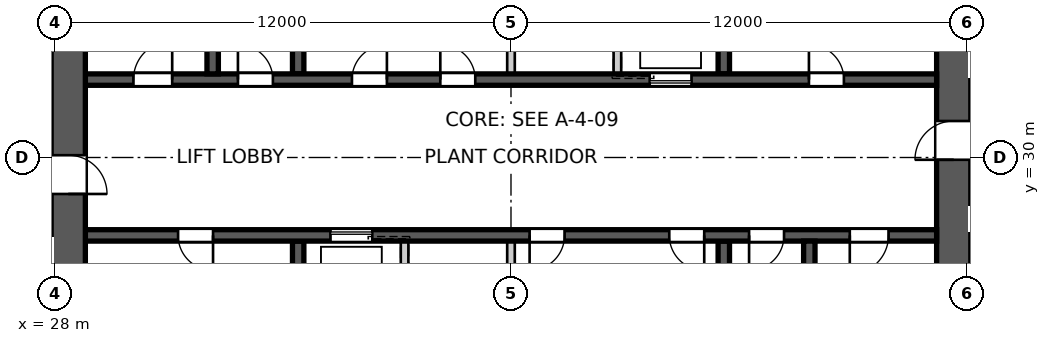
"""IFC4 building model, lengths in metres.
Left out: names, types, materials, properties, quantities, classifications, styles, units other than length and angle.
Written with IfcOpenShell. Run it as: python <this file> out.ifc"""

import sys

from ifc_helpers import new_model, si_unit, direction, frame, frame_2d, origin, place, context, subcontext, project, spatial, polyline, rectangle, outline, extrude, element, fill, save


model = new_model("IFC4")
c1 = context("Model", 3, precision=1e-05, world=origin(), true_north=direction((0.0, 1.0)))
c2 = subcontext(c1, "Body", "Model", "MODEL_VIEW")
j1 = project(units=[si_unit("LENGTHUNIT", "METRE"), si_unit("PLANEANGLEUNIT", "RADIAN")], contexts=[c1])
p1 = place(None, origin())
s1 = spatial("IfcSite", under=j1, at=p1, CompositionType="ELEMENT")
p2 = place(p1, origin())
s2 = spatial("IfcBuilding", under=s1, at=p2, CompositionType="ELEMENT")
p3 = place(p2, frame((0.0, 0.0, 299.8)))
s3 = spatial("IfcBuildingStorey", under=s2, at=p3, CompositionType="ELEMENT", Elevation=299.8)
p4 = place(p3, frame((51.65, 18.8, 0.0), z_axis=(0.0, 0.0, 1.0), x_axis=(0.0, 1.0, 0.0)))
e1 = element("IfcWall", 1, at=p4, inside=s3, PredefinedType="SHEAR", context=c2, shape_type="SweptSolid", body=[
    extrude(outline(polyline([(0.0, -0.45), (22.4, -0.45), (22.4, -0.025), (22.85, -0.025), (22.85, 0.025), (22.4, 0.025), (22.4, 0.45), (0.0, 0.45), (0.0, 0.025), (-0.45, 0.025), (-0.45, -0.025), (0.0, -0.025), (0.0, -0.45)])), origin(), (0.0, 0.0, 1.0), 4.5),
])
p5 = place(p4, frame((11.14, 0.0, 0.0)))
e2 = element("IfcOpeningElement", 2, at=p5, cuts=e1, PredefinedType="OPENING", context=c2, shape_type="SweptSolid", body=[
    extrude(rectangle(XDim=1.02, YDim=2.4, at=frame_2d((0.51, 1.2))), frame((0.0, 0.46, 0.0), z_axis=(0.0, -1.0, 0.0), x_axis=(1.0, 0.0, 0.0)), (0.0, 0.0, 1.0), 0.92),
])
p6 = place(p3, frame((28.35, 41.2, 0.0), z_axis=(0.0, 0.0, 1.0), x_axis=(0.0, -1.0, 0.0)))
e3 = element("IfcWall", 3, at=p6, inside=s3, PredefinedType="SHEAR", context=c2, shape_type="SweptSolid", body=[
    extrude(outline(polyline([(0.0, -0.45), (22.4, -0.45), (22.4, -0.025), (22.85, -0.025), (22.85, 0.025), (22.4, 0.025), (22.4, 0.45), (0.0, 0.45), (0.0, 0.025), (-0.45, 0.025), (-0.45, -0.025), (0.0, -0.025), (0.0, -0.45)])), origin(), (0.0, 0.0, 1.0), 4.5),
])
p7 = place(p6, frame((11.14, 0.0, 0.0)))
e4 = element("IfcOpeningElement", 4, at=p7, cuts=e3, PredefinedType="OPENING", context=c2, shape_type="SweptSolid", body=[
    extrude(rectangle(XDim=1.02, YDim=2.4, at=frame_2d((0.51, 1.2))), frame((0.0, 0.46, 0.0), z_axis=(0.0, -1.0, 0.0), x_axis=(1.0, 0.0, 0.0)), (0.0, 0.0, 1.0), 0.92),
])
p8 = place(p3, frame((28.8, 32.05, 0.0), z_axis=(0.0, 0.0, 1.0), x_axis=(1.0, 0.0, 0.0)))
e5 = element("IfcWall", 5, at=p8, inside=s3, PredefinedType="SHEAR", context=c2, shape_type="SweptSolid", body=[
    extrude(rectangle(XDim=22.4, YDim=0.3, at=frame_2d((11.2, 0.0))), origin(), (0.0, 0.0, 1.0), 4.5),
])
p9 = place(p8, frame((19.04, 0.0, 0.0)))
e6 = element("IfcOpeningElement", 6, at=p9, cuts=e5, PredefinedType="OPENING", context=c2, shape_type="SweptSolid", body=[
    extrude(rectangle(XDim=0.92, YDim=2.1, at=frame_2d((0.46, 1.05))), frame((0.0, 0.16, 0.0), z_axis=(0.0, -1.0, 0.0), x_axis=(1.0, 0.0, 0.0)), (0.0, 0.0, 1.0), 0.32),
])
p10 = place(p8, frame((1.265, 0.0, 0.0)))
e7 = element("IfcOpeningElement", 7, at=p10, cuts=e5, PredefinedType="OPENING", context=c2, shape_type="SweptSolid", body=[
    extrude(rectangle(XDim=1.02, YDim=2.1, at=frame_2d((0.51, 1.05))), frame((0.0, 0.16, 0.0), z_axis=(0.0, -1.0, 0.0), x_axis=(1.0, 0.0, 0.0)), (0.0, 0.0, 1.0), 0.32),
])
p11 = place(p8, frame((4.015, 0.0, 0.0)))
e8 = element("IfcOpeningElement", 8, at=p11, cuts=e5, PredefinedType="OPENING", context=c2, shape_type="SweptSolid", body=[
    extrude(rectangle(XDim=0.92, YDim=2.1, at=frame_2d((0.46, 1.05))), frame((0.0, 0.16, 0.0), z_axis=(0.0, -1.0, 0.0), x_axis=(1.0, 0.0, 0.0)), (0.0, 0.0, 1.0), 0.32),
])
p12 = place(p8, frame((7.015, 0.0, 0.0)))
e9 = element("IfcOpeningElement", 9, at=p12, cuts=e5, PredefinedType="OPENING", context=c2, shape_type="SweptSolid", body=[
    extrude(rectangle(XDim=0.92, YDim=2.1, at=frame_2d((0.46, 1.05))), frame((0.0, 0.16, 0.0), z_axis=(0.0, -1.0, 0.0), x_axis=(1.0, 0.0, 0.0)), (0.0, 0.0, 1.0), 0.32),
])
p13 = place(p8, frame((9.34, 0.0, 0.0)))
e10 = element("IfcOpeningElement", 10, at=p13, cuts=e5, PredefinedType="OPENING", context=c2, shape_type="SweptSolid", body=[
    extrude(rectangle(XDim=0.92, YDim=2.1, at=frame_2d((0.46, 1.05))), frame((0.0, 0.16, 0.0), z_axis=(0.0, -1.0, 0.0), x_axis=(1.0, 0.0, 0.0)), (0.0, 0.0, 1.0), 0.32),
])
p14 = place(p8, frame((14.85, 0.0, 0.0)))
e11 = element("IfcOpeningElement", 11, at=p14, cuts=e5, PredefinedType="OPENING", context=c2, shape_type="SweptSolid", body=[
    extrude(rectangle(XDim=1.1, YDim=2.1, at=frame_2d((0.55, 1.05))), frame((0.0, 0.16, 0.0), z_axis=(0.0, -1.0, 0.0), x_axis=(1.0, 0.0, 0.0)), (0.0, 0.0, 1.0), 0.32),
])
p15 = place(p3, frame((51.2, 27.95, 0.0), z_axis=(0.0, 0.0, 1.0), x_axis=(-1.0, 0.0, 0.0)))
e12 = element("IfcWall", 12, at=p15, inside=s3, PredefinedType="SHEAR", context=c2, shape_type="SweptSolid", body=[
    extrude(rectangle(XDim=22.4, YDim=0.3, at=frame_2d((11.2, 0.0))), origin(), (0.0, 0.0, 1.0), 4.5),
])
p16 = place(p15, frame((19.04, 0.0, 0.0)))
e13 = element("IfcOpeningElement", 13, at=p16, cuts=e12, PredefinedType="OPENING", context=c2, shape_type="SweptSolid", body=[
    extrude(rectangle(XDim=0.92, YDim=2.1, at=frame_2d((0.46, 1.05))), frame((0.0, 0.16, 0.0), z_axis=(0.0, -1.0, 0.0), x_axis=(1.0, 0.0, 0.0)), (0.0, 0.0, 1.0), 0.32),
])
p17 = place(p15, frame((1.265, 0.0, 0.0)))
e14 = element("IfcOpeningElement", 14, at=p17, cuts=e12, PredefinedType="OPENING", context=c2, shape_type="SweptSolid", body=[
    extrude(rectangle(XDim=1.02, YDim=2.1, at=frame_2d((0.51, 1.05))), frame((0.0, 0.16, 0.0), z_axis=(0.0, -1.0, 0.0), x_axis=(1.0, 0.0, 0.0)), (0.0, 0.0, 1.0), 0.32),
])
p18 = place(p15, frame((4.015, 0.0, 0.0)))
e15 = element("IfcOpeningElement", 15, at=p18, cuts=e12, PredefinedType="OPENING", context=c2, shape_type="SweptSolid", body=[
    extrude(rectangle(XDim=0.92, YDim=2.1, at=frame_2d((0.46, 1.05))), frame((0.0, 0.16, 0.0), z_axis=(0.0, -1.0, 0.0), x_axis=(1.0, 0.0, 0.0)), (0.0, 0.0, 1.0), 0.32),
])
p19 = place(p15, frame((9.79, 0.0, 0.0)))
e16 = element("IfcOpeningElement", 16, at=p19, cuts=e12, PredefinedType="OPENING", context=c2, shape_type="SweptSolid", body=[
    extrude(rectangle(XDim=0.92, YDim=2.1, at=frame_2d((0.46, 1.05))), frame((0.0, 0.16, 0.0), z_axis=(0.0, -1.0, 0.0), x_axis=(1.0, 0.0, 0.0)), (0.0, 0.0, 1.0), 0.32),
])
p20 = place(p15, frame((6.115, 0.0, 0.0)))
e17 = element("IfcOpeningElement", 17, at=p20, cuts=e12, PredefinedType="OPENING", context=c2, shape_type="SweptSolid", body=[
    extrude(rectangle(XDim=0.92, YDim=2.1, at=frame_2d((0.46, 1.05))), frame((0.0, 0.16, 0.0), z_axis=(0.0, -1.0, 0.0), x_axis=(1.0, 0.0, 0.0)), (0.0, 0.0, 1.0), 0.32),
])
p21 = place(p15, frame((14.85, 0.0, 0.0)))
e18 = element("IfcOpeningElement", 18, at=p21, cuts=e12, PredefinedType="OPENING", context=c2, shape_type="SweptSolid", body=[
    extrude(rectangle(XDim=1.1, YDim=2.1, at=frame_2d((0.55, 1.05))), frame((0.0, 0.16, 0.0), z_axis=(0.0, -1.0, 0.0), x_axis=(1.0, 0.0, 0.0)), (0.0, 0.0, 1.0), 0.32),
])
for number, where, z_axis, x_axis in (
    (19, (34.4, 32.2, 0.0), (0.0, 0.0, 1.0), (0.0, 1.0, 0.0)),
    (20, (45.6, 27.8, 0.0), (0.0, 0.0, 1.0), (0.0, -1.0, 0.0)),
):
    element("IfcWall", number, at=place(p3, frame(where, z_axis=z_axis, x_axis=x_axis)), inside=s3, PredefinedType="SHEAR", context=c2, shape_type="SweptSolid", body=[
        extrude(rectangle(XDim=2.8, YDim=0.3, at=frame_2d((1.4, 0.0))), origin(), (0.0, 0.0, 1.0), 4.5),
    ])
for number, where, z_axis, x_axis in (
    (21, (40.0, 32.2, 0.0), (0.0, 0.0, 1.0), (0.0, 1.0, 0.0)),
    (22, (40.0, 27.8, 0.0), (0.0, 0.0, 1.0), (0.0, -1.0, 0.0)),
    (23, (42.8, 32.2, 0.0), (0.0, 0.0, 1.0), (0.0, 1.0, 0.0)),
    (24, (37.2, 27.8, 0.0), (0.0, 0.0, 1.0), (0.0, -1.0, 0.0)),
):
    element("IfcWall", number, at=place(p3, frame(where, z_axis=z_axis, x_axis=x_axis)), inside=s3, PredefinedType="SOLIDWALL", context=c2, shape_type="SweptSolid", body=[
        extrude(rectangle(XDim=2.8, YDim=0.2, at=frame_2d((1.4, 0.0))), origin(), (0.0, 0.0, 1.0), 4.5),
    ])
for number, where, z_axis, x_axis in (
    (25, (45.6, 32.2, 0.0), (0.0, 0.0, 1.0), (0.0, 1.0, 0.0)),
    (26, (34.4, 27.8, 0.0), (0.0, 0.0, 1.0), (0.0, -1.0, 0.0)),
):
    element("IfcWall", number, at=place(p3, frame(where, z_axis=z_axis, x_axis=x_axis)), inside=s3, PredefinedType="SHEAR", context=c2, shape_type="SweptSolid", body=[
        extrude(rectangle(XDim=2.8, YDim=0.3, at=frame_2d((1.4, 0.0))), origin(), (0.0, 0.0, 1.0), 4.5),
    ])
for number, where, z_axis, x_axis in (
    (27, (32.15, 32.2, 0.0), (0.0, 0.0, 1.0), (0.0, 1.0, 0.0)),
    (28, (47.85, 27.8, 0.0), (0.0, 0.0, 1.0), (0.0, -1.0, 0.0)),
):
    element("IfcWall", number, at=place(p3, frame(where, z_axis=z_axis, x_axis=x_axis)), inside=s3, PredefinedType="SHEAR", context=c2, shape_type="SweptSolid", body=[
        extrude(rectangle(XDim=7.7, YDim=0.3, at=frame_2d((3.85, 0.0))), origin(), (0.0, 0.0, 1.0), 4.5),
    ])
p22 = place(p9, origin())
e29 = element("IfcDoor", 29, at=p22, inside=s3, OperationType="SINGLE_SWING_LEFT", PredefinedType="DOOR", context=c2, shape_type="SweptSolid", body=[
    extrude(rectangle(XDim=0.92, YDim=2.1, at=frame_2d((0.46, 1.05))), frame((0.0, 0.025, 0.0), z_axis=(0.0, -1.0, 0.0), x_axis=(1.0, 0.0, 0.0)), (0.0, 0.0, 1.0), 0.05),
])
fill(e6, e29)
p23 = place(p16, origin())
e30 = element("IfcDoor", 30, at=p23, inside=s3, OperationType="SINGLE_SWING_LEFT", PredefinedType="DOOR", context=c2, shape_type="SweptSolid", body=[
    extrude(rectangle(XDim=0.92, YDim=2.1, at=frame_2d((0.46, 1.05))), frame((0.0, 0.025, 0.0), z_axis=(0.0, -1.0, 0.0), x_axis=(1.0, 0.0, 0.0)), (0.0, 0.0, 1.0), 0.05),
])
fill(e13, e30)
p24 = place(p17, origin())
e31 = element("IfcDoor", 31, at=p24, inside=s3, OperationType="SINGLE_SWING_RIGHT", PredefinedType="DOOR", context=c2, shape_type="SweptSolid", body=[
    extrude(rectangle(XDim=1.02, YDim=2.1, at=frame_2d((0.51, 1.05))), frame((0.0, 0.025, 0.0), z_axis=(0.0, -1.0, 0.0), x_axis=(1.0, 0.0, 0.0)), (0.0, 0.0, 1.0), 0.05),
])
fill(e14, e31)
p25 = place(p10, origin())
e32 = element("IfcDoor", 32, at=p25, inside=s3, OperationType="SINGLE_SWING_RIGHT", PredefinedType="DOOR", context=c2, shape_type="SweptSolid", body=[
    extrude(rectangle(XDim=1.02, YDim=2.1, at=frame_2d((0.51, 1.05))), frame((0.0, 0.025, 0.0), z_axis=(0.0, -1.0, 0.0), x_axis=(1.0, 0.0, 0.0)), (0.0, 0.0, 1.0), 0.05),
])
fill(e7, e32)
p26 = place(p11, origin())
e33 = element("IfcDoor", 33, at=p26, inside=s3, OperationType="SINGLE_SWING_LEFT", PredefinedType="DOOR", context=c2, shape_type="SweptSolid", body=[
    extrude(rectangle(XDim=0.92, YDim=2.1, at=frame_2d((0.46, 1.05))), frame((0.0, 0.025, 0.0), z_axis=(0.0, -1.0, 0.0), x_axis=(1.0, 0.0, 0.0)), (0.0, 0.0, 1.0), 0.05),
])
fill(e8, e33)
p27 = place(p18, origin())
e34 = element("IfcDoor", 34, at=p27, inside=s3, OperationType="SINGLE_SWING_RIGHT", PredefinedType="DOOR", context=c2, shape_type="SweptSolid", body=[
    extrude(rectangle(XDim=0.92, YDim=2.1, at=frame_2d((0.46, 1.05))), frame((0.0, 0.025, 0.0), z_axis=(0.0, -1.0, 0.0), x_axis=(1.0, 0.0, 0.0)), (0.0, 0.0, 1.0), 0.05),
])
fill(e15, e34)
p28 = place(p12, origin())
e35 = element("IfcDoor", 35, at=p28, inside=s3, OperationType="SINGLE_SWING_RIGHT", PredefinedType="DOOR", context=c2, shape_type="SweptSolid", body=[
    extrude(rectangle(XDim=0.92, YDim=2.1, at=frame_2d((0.46, 1.05))), frame((0.0, 0.025, 0.0), z_axis=(0.0, -1.0, 0.0), x_axis=(1.0, 0.0, 0.0)), (0.0, 0.0, 1.0), 0.05),
])
fill(e9, e35)
p29 = place(p13, origin())
e36 = element("IfcDoor", 36, at=p29, inside=s3, OperationType="SINGLE_SWING_LEFT", PredefinedType="DOOR", context=c2, shape_type="SweptSolid", body=[
    extrude(rectangle(XDim=0.92, YDim=2.1, at=frame_2d((0.46, 1.05))), frame((0.0, 0.025, 0.0), z_axis=(0.0, -1.0, 0.0), x_axis=(1.0, 0.0, 0.0)), (0.0, 0.0, 1.0), 0.05),
])
fill(e10, e36)
p30 = place(p19, origin())
e37 = element("IfcDoor", 37, at=p30, inside=s3, OperationType="SINGLE_SWING_RIGHT", PredefinedType="DOOR", context=c2, shape_type="SweptSolid", body=[
    extrude(rectangle(XDim=0.92, YDim=2.1, at=frame_2d((0.46, 1.05))), frame((0.0, 0.025, 0.0), z_axis=(0.0, -1.0, 0.0), x_axis=(1.0, 0.0, 0.0)), (0.0, 0.0, 1.0), 0.05),
])
fill(e16, e37)
p31 = place(p20, origin())
e38 = element("IfcDoor", 38, at=p31, inside=s3, OperationType="SINGLE_SWING_LEFT", PredefinedType="DOOR", context=c2, shape_type="SweptSolid", body=[
    extrude(rectangle(XDim=0.92, YDim=2.1, at=frame_2d((0.46, 1.05))), frame((0.0, 0.025, 0.0), z_axis=(0.0, -1.0, 0.0), x_axis=(1.0, 0.0, 0.0)), (0.0, 0.0, 1.0), 0.05),
])
fill(e17, e38)
p32 = place(p5, origin())
e39 = element("IfcDoor", 39, at=p32, inside=s3, OperationType="SINGLE_SWING_LEFT", PredefinedType="DOOR", context=c2, shape_type="SweptSolid", body=[
    extrude(rectangle(XDim=1.02, YDim=2.4, at=frame_2d((0.51, 1.2))), frame((0.0, 0.025, 0.0), z_axis=(0.0, -1.0, 0.0), x_axis=(1.0, 0.0, 0.0)), (0.0, 0.0, 1.0), 0.05),
])
fill(e2, e39)
p33 = place(p7, origin())
e40 = element("IfcDoor", 40, at=p33, inside=s3, OperationType="SINGLE_SWING_RIGHT", PredefinedType="DOOR", context=c2, shape_type="SweptSolid", body=[
    extrude(rectangle(XDim=1.02, YDim=2.4, at=frame_2d((0.51, 1.2))), frame((0.0, 0.025, 0.0), z_axis=(0.0, -1.0, 0.0), x_axis=(1.0, 0.0, 0.0)), (0.0, 0.0, 1.0), 0.05),
])
fill(e4, e40)
p34 = place(p14, origin())
e41 = element("IfcDoor", 41, at=p34, inside=s3, OperationType="SLIDING_TO_LEFT", PredefinedType="DOOR", context=c2, shape_type="SweptSolid", body=[
    extrude(rectangle(XDim=1.1, YDim=2.1, at=frame_2d((0.55, 1.05))), frame((0.0, 0.025, 0.0), z_axis=(0.0, -1.0, 0.0), x_axis=(1.0, 0.0, 0.0)), (0.0, 0.0, 1.0), 0.05),
])
fill(e11, e41)
p35 = place(p21, origin())
e42 = element("IfcDoor", 42, at=p35, inside=s3, OperationType="SLIDING_TO_LEFT", PredefinedType="DOOR", context=c2, shape_type="SweptSolid", body=[
    extrude(rectangle(XDim=1.1, YDim=2.1, at=frame_2d((0.55, 1.05))), frame((0.0, 0.025, 0.0), z_axis=(0.0, -1.0, 0.0), x_axis=(1.0, 0.0, 0.0)), (0.0, 0.0, 1.0), 0.05),
])
fill(e18, e42)
save(model, sys.argv[1])
